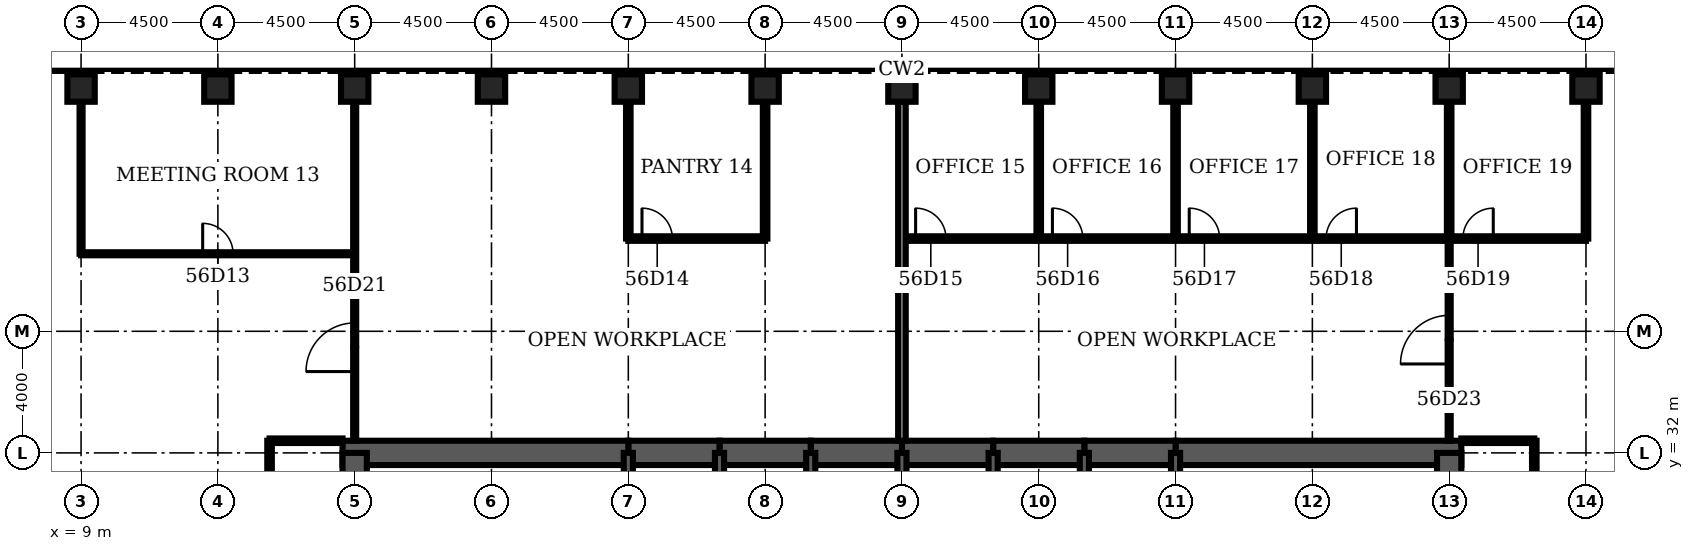
"""IFC4 building model, lengths in metres.
Left out: names, types, materials, properties, quantities, classifications, styles, units other than length and angle.
Written with IfcOpenShell. Run it as: python <this file> out.ifc"""

import sys

from ifc_helpers import new_model, si_unit, direction, frame, frame_2d, origin, origin_2d, place, context, subcontext, project, spatial, rectangle, hollow_rectangle, extrude, element, fill, save


model = new_model("IFC4")
c1 = context("Model", 3, precision=1e-05, world=origin(), true_north=direction((0.0, 1.0)))
c2 = subcontext(c1, "Body", "Model", "MODEL_VIEW")
j1 = project(units=[si_unit("LENGTHUNIT", "METRE"), si_unit("PLANEANGLEUNIT", "RADIAN")], contexts=[c1])
p1 = place(None, origin())
s1 = spatial("IfcSite", under=j1, at=p1, CompositionType="ELEMENT")
p2 = place(p1, origin())
s2 = spatial("IfcBuilding", under=s1, at=p2, CompositionType="ELEMENT")
p3 = place(p2, frame((0.0, 0.0, 248.8)))
s3 = spatial("IfcBuildingStorey", under=s2, at=p3, CompositionType="ELEMENT", Elevation=248.8)
for number, where, z_axis, x_axis in (
    (1, (58.5, 44.0, 0.0), (0.0, 0.0, 1.0), (0.0, 1.0, 0.0)),
    (2, (54.0, 44.0, 0.0), (0.0, 0.0, 1.0), (0.0, 1.0, 0.0)),
    (3, (49.5, 44.0, 0.0), (0.0, 0.0, 1.0), (0.0, 1.0, 0.0)),
    (4, (45.0, 44.0, 0.0), (0.0, 0.0, 1.0), (0.0, 1.0, 0.0)),
    (5, (40.5, 44.0, 0.0), (0.0, 0.0, 1.0), (0.0, 1.0, 0.0)),
    (6, (36.0, 44.0, 0.0), (0.0, 0.0, 1.0), (0.0, 1.0, 0.0)),
    (7, (31.5, 44.0, 0.0), (0.0, 0.0, 1.0), (0.0, 1.0, 0.0)),
    (8, (27.0, 44.0, 0.0), (0.0, 0.0, 1.0), (0.0, 1.0, 0.0)),
    (9, (22.5, 44.0, 0.0), (0.0, 0.0, 1.0), (0.0, 1.0, 0.0)),
    (10, (18.0, 44.0, 0.0), (0.0, 0.0, 1.0), (0.0, 1.0, 0.0)),
    (11, (13.5, 44.0, 0.0), (0.0, 0.0, 1.0), (0.0, 1.0, 0.0)),
    (12, (9.0, 44.0, 0.0), (0.0, 0.0, 1.0), (0.0, 1.0, 0.0)),
):
    element("IfcColumn", number, at=place(p3, frame(where, z_axis=z_axis, x_axis=x_axis)), inside=s3, PredefinedType="COLUMN", context=c2, shape_type="SweptSolid", body=[
        extrude(hollow_rectangle(XDim=0.9, YDim=0.9, WallThickness=0.07, at=origin_2d()), origin(), (0.0, 0.0, 1.0), 4.2),
    ])
p4 = place(p3, frame((54.4, 32.0, 0.0), z_axis=(0.0, 0.0, 1.0), x_axis=(-1.0, 0.0, 0.0)))
e13 = element("IfcWall", 13, at=p4, inside=s3, PredefinedType="SHEAR", context=c2, shape_type="SweptSolid", body=[
    extrude(rectangle(XDim=9.4, YDim=0.8, at=frame_2d((4.7, 0.0))), origin(), (0.0, 0.0, 1.0), 4.2),
])
for number, where, z_axis, x_axis in (
    (14, (45.0, 32.0, 0.0), (0.0, 0.0, 1.0), (-1.0, 0.0, 0.0)),
    (15, (42.0, 32.0, 0.0), (0.0, 0.0, 1.0), (-1.0, 0.0, 0.0)),
    (16, (39.0, 32.0, 0.0), (0.0, 0.0, 1.0), (-1.0, 0.0, 0.0)),
    (17, (36.0, 32.0, 0.0), (0.0, 0.0, 1.0), (-1.0, 0.0, 0.0)),
    (18, (33.0, 32.0, 0.0), (0.0, 0.0, 1.0), (-1.0, 0.0, 0.0)),
    (19, (30.0, 32.0, 0.0), (0.0, 0.0, 1.0), (-1.0, 0.0, 0.0)),
):
    element("IfcWall", number, at=place(p3, frame(where, z_axis=z_axis, x_axis=x_axis)), inside=s3, PredefinedType="SHEAR", context=c2, shape_type="SweptSolid", body=[
        extrude(rectangle(XDim=3.0, YDim=0.8, at=frame_2d((1.5, 0.0))), origin(), (0.0, 0.0, 1.0), 4.2),
    ])
p5 = place(p3, frame((27.0, 32.0, 0.0), z_axis=(0.0, 0.0, 1.0), x_axis=(-1.0, 0.0, 0.0)))
e20 = element("IfcWall", 20, at=p5, inside=s3, PredefinedType="SHEAR", context=c2, shape_type="SweptSolid", body=[
    extrude(rectangle(XDim=9.4, YDim=0.8, at=frame_2d((4.7, 0.0))), origin(), (0.0, 0.0, 1.0), 4.2),
])
for number, where, z_axis, x_axis in (
    (21, (18.0, 32.0, 0.0), (0.0, 0.0, 1.0), (0.0, -1.0, 0.0)),
    (22, (54.0, 28.8, 0.0), (0.0, 0.0, 1.0), (0.0, 1.0, 0.0)),
):
    element("IfcWall", number, at=place(p3, frame(where, z_axis=z_axis, x_axis=x_axis)), inside=s3, PredefinedType="SHEAR", context=c2, shape_type="SweptSolid", body=[
        extrude(rectangle(XDim=3.2, YDim=0.8, at=frame_2d((1.6, 0.0))), origin(), (0.0, 0.0, 1.0), 4.2),
    ])
for number, where, z_axis, x_axis in (
    (23, (27.0, 28.8, 0.0), (0.0, 0.0, 1.0), (0.0, 1.0, 0.0)),
    (24, (30.0, 28.8, 0.0), (0.0, 0.0, 1.0), (0.0, 1.0, 0.0)),
    (25, (33.0, 28.8, 0.0), (0.0, 0.0, 1.0), (0.0, 1.0, 0.0)),
    (26, (36.0, 28.8, 0.0), (0.0, 0.0, 1.0), (0.0, 1.0, 0.0)),
    (27, (39.0, 28.8, 0.0), (0.0, 0.0, 1.0), (0.0, 1.0, 0.0)),
    (28, (42.0, 28.8, 0.0), (0.0, 0.0, 1.0), (0.0, 1.0, 0.0)),
    (29, (45.0, 28.8, 0.0), (0.0, 0.0, 1.0), (0.0, 1.0, 0.0)),
):
    element("IfcWall", number, at=place(p3, frame(where, z_axis=z_axis, x_axis=x_axis)), inside=s3, PredefinedType="SOLIDWALL", context=c2, shape_type="SweptSolid", body=[
        extrude(rectangle(XDim=3.2, YDim=0.3, at=frame_2d((1.6, 0.0))), origin(), (0.0, 0.0, 1.0), 4.2),
    ])
for number, where, z_axis, x_axis in (
    (30, (15.2, 32.4, 0.0), (0.0, 0.0, 1.0), (1.0, 0.0, 0.0)),
    (31, (54.4, 32.4, 0.0), (0.0, 0.0, 1.0), (1.0, 0.0, 0.0)),
):
    element("IfcWall", number, at=place(p3, frame(where, z_axis=z_axis, x_axis=x_axis)), inside=s3, PredefinedType="PARTITIONING", context=c2, shape_type="SweptSolid", body=[
        extrude(rectangle(XDim=2.4, YDim=0.15, at=frame_2d((1.2, 0.0))), origin(), (0.0, 0.0, 1.0), 3.0),
    ])
p6 = place(p3, frame((9.0, 38.55, 0.0), z_axis=(0.0, 0.0, 1.0), x_axis=(1.0, 0.0, 0.0)))
e32 = element("IfcWall", 32, at=p6, inside=s3, PredefinedType="PARTITIONING", context=c2, shape_type="SweptSolid", body=[
    extrude(rectangle(XDim=9.0, YDim=0.1, at=frame_2d((4.5, 0.0))), origin(), (0.0, 0.0, 1.0), 3.0),
])
p7 = place(p6, frame((4.0, 0.0, 0.0)))
e33 = element("IfcOpeningElement", 33, at=p7, cuts=e32, PredefinedType="OPENING", context=c2, shape_type="SweptSolid", body=[
    extrude(rectangle(XDim=1.0, YDim=2.1, at=frame_2d((0.5, 1.05))), frame((0.0, 0.06, 0.0), z_axis=(0.0, -1.0, 0.0), x_axis=(1.0, 0.0, 0.0)), (0.0, 0.0, 1.0), 0.12),
])
p8 = place(p3, frame((27.0, 39.05, 0.0), z_axis=(0.0, 0.0, 1.0), x_axis=(1.0, 0.0, 0.0)))
e34 = element("IfcWall", 34, at=p8, inside=s3, PredefinedType="PARTITIONING", context=c2, shape_type="SweptSolid", body=[
    extrude(rectangle(XDim=4.5, YDim=0.15, at=frame_2d((2.25, 0.0))), origin(), (0.0, 0.0, 1.0), 3.0),
])
p9 = place(p8, frame((0.45, 0.0, 0.0)))
e35 = element("IfcOpeningElement", 35, at=p9, cuts=e34, PredefinedType="OPENING", context=c2, shape_type="SweptSolid", body=[
    extrude(rectangle(XDim=1.0, YDim=2.1, at=frame_2d((0.5, 1.05))), frame((0.0, 0.085, 0.0), z_axis=(0.0, -1.0, 0.0), x_axis=(1.0, 0.0, 0.0)), (0.0, 0.0, 1.0), 0.17),
])
p10 = place(p3, frame((36.0, 39.05, 0.0), z_axis=(0.0, 0.0, 1.0), x_axis=(1.0, 0.0, 0.0)))
e36 = element("IfcWall", 36, at=p10, inside=s3, PredefinedType="PARTITIONING", context=c2, shape_type="SweptSolid", body=[
    extrude(rectangle(XDim=22.5, YDim=0.15, at=frame_2d((11.25, 0.0))), origin(), (0.0, 0.0, 1.0), 3.0),
])
p11 = place(p10, frame((0.45, 0.0, 0.0)))
e37 = element("IfcOpeningElement", 37, at=p11, cuts=e36, PredefinedType="OPENING", context=c2, shape_type="SweptSolid", body=[
    extrude(rectangle(XDim=1.0, YDim=2.1, at=frame_2d((0.5, 1.05))), frame((0.0, 0.085, 0.0), z_axis=(0.0, -1.0, 0.0), x_axis=(1.0, 0.0, 0.0)), (0.0, 0.0, 1.0), 0.17),
])
p12 = place(p10, frame((4.95, 0.0, 0.0)))
e38 = element("IfcOpeningElement", 38, at=p12, cuts=e36, PredefinedType="OPENING", context=c2, shape_type="SweptSolid", body=[
    extrude(rectangle(XDim=1.0, YDim=2.1, at=frame_2d((0.5, 1.05))), frame((0.0, 0.085, 0.0), z_axis=(0.0, -1.0, 0.0), x_axis=(1.0, 0.0, 0.0)), (0.0, 0.0, 1.0), 0.17),
])
p13 = place(p10, frame((9.45, 0.0, 0.0)))
e39 = element("IfcOpeningElement", 39, at=p13, cuts=e36, PredefinedType="OPENING", context=c2, shape_type="SweptSolid", body=[
    extrude(rectangle(XDim=1.0, YDim=2.1, at=frame_2d((0.5, 1.05))), frame((0.0, 0.085, 0.0), z_axis=(0.0, -1.0, 0.0), x_axis=(1.0, 0.0, 0.0)), (0.0, 0.0, 1.0), 0.17),
])
p14 = place(p10, frame((13.95, 0.0, 0.0)))
e40 = element("IfcOpeningElement", 40, at=p14, cuts=e36, PredefinedType="OPENING", context=c2, shape_type="SweptSolid", body=[
    extrude(rectangle(XDim=1.0, YDim=2.1, at=frame_2d((0.5, 1.05))), frame((0.0, 0.085, 0.0), z_axis=(0.0, -1.0, 0.0), x_axis=(1.0, 0.0, 0.0)), (0.0, 0.0, 1.0), 0.17),
])
p15 = place(p10, frame((18.45, 0.0, 0.0)))
e41 = element("IfcOpeningElement", 41, at=p15, cuts=e36, PredefinedType="OPENING", context=c2, shape_type="SweptSolid", body=[
    extrude(rectangle(XDim=1.0, YDim=2.1, at=frame_2d((0.5, 1.05))), frame((0.0, 0.085, 0.0), z_axis=(0.0, -1.0, 0.0), x_axis=(1.0, 0.0, 0.0)), (0.0, 0.0, 1.0), 0.17),
])
p16 = place(p3, frame((9.0, 38.55, 0.0), z_axis=(0.0, 0.0, 1.0), x_axis=(0.0, 1.0, 0.0)))
e42 = element("IfcWall", 42, at=p16, inside=s3, PredefinedType="PARTITIONING", context=c2, shape_type="SweptSolid", body=[
    extrude(rectangle(XDim=5.0, YDim=0.1, at=frame_2d((2.5, 0.0))), origin(), (0.0, 0.0, 1.0), 3.0),
])
p17 = place(p3, frame((15.2, 13.8, 0.0), z_axis=(0.0, 0.0, 1.0), x_axis=(0.0, 1.0, 0.0)))
e43 = element("IfcWall", 43, at=p17, inside=s3, PredefinedType="PARTITIONING", context=c2, shape_type="SweptSolid", body=[
    extrude(rectangle(XDim=18.6, YDim=0.15, at=frame_2d((9.3, 0.0))), origin(), (0.0, 0.0, 1.0), 3.0),
])
p18 = place(p17, frame((8.7, 0.0, 0.0)))
e44 = element("IfcOpeningElement", 44, at=p18, cuts=e43, PredefinedType="OPENING", context=c2, shape_type="SweptSolid", body=[
    extrude(rectangle(XDim=1.2, YDim=2.1, at=frame_2d((0.6, 1.05))), frame((0.0, 0.085, 0.0), z_axis=(0.0, -1.0, 0.0), x_axis=(1.0, 0.0, 0.0)), (0.0, 0.0, 1.0), 0.17),
])
p19 = place(p3, frame((18.0, 32.4, 0.0), z_axis=(0.0, 0.0, 1.0), x_axis=(0.0, 1.0, 0.0)))
e45 = element("IfcWall", 45, at=p19, inside=s3, PredefinedType="PARTITIONING", context=c2, shape_type="SweptSolid", body=[
    extrude(rectangle(XDim=11.15, YDim=0.1, at=frame_2d((5.575, 0.0))), origin(), (0.0, 0.0, 1.0), 3.0),
])
p20 = place(p19, frame((2.275, 0.0, 0.0)))
e46 = element("IfcOpeningElement", 46, at=p20, cuts=e45, PredefinedType="OPENING", context=c2, shape_type="SweptSolid", body=[
    extrude(rectangle(XDim=1.6, YDim=2.1, at=frame_2d((0.8, 1.05))), frame((0.0, 0.06, 0.0), z_axis=(0.0, -1.0, 0.0), x_axis=(1.0, 0.0, 0.0)), (0.0, 0.0, 1.0), 0.12),
])
for number, where, z_axis, x_axis in (
    (47, (27.0, 39.05, 0.0), (0.0, 0.0, 1.0), (0.0, 1.0, 0.0)),
    (48, (31.5, 39.05, 0.0), (0.0, 0.0, 1.0), (0.0, 1.0, 0.0)),
):
    element("IfcWall", number, at=place(p3, frame(where, z_axis=z_axis, x_axis=x_axis)), inside=s3, PredefinedType="PARTITIONING", context=c2, shape_type="SweptSolid", body=[
        extrude(rectangle(XDim=4.5, YDim=0.15, at=frame_2d((2.25, 0.0))), origin(), (0.0, 0.0, 1.0), 3.0),
    ])
p21 = place(p3, frame((36.0, 32.4, 0.0), z_axis=(0.0, 0.0, 1.0), x_axis=(0.0, 1.0, 0.0)))
e49 = element("IfcWall", 49, at=p21, inside=s3, PredefinedType="PARTITIONING", context=c2, shape_type="SweptSolid", body=[
    extrude(rectangle(XDim=11.15, YDim=0.25, at=frame_2d((5.575, 0.0))), origin(), (0.0, 0.0, 1.0), 3.0),
])
for number, where, z_axis, x_axis in (
    (50, (40.5, 39.05, 0.0), (0.0, 0.0, 1.0), (0.0, 1.0, 0.0)),
    (51, (45.0, 39.05, 0.0), (0.0, 0.0, 1.0), (0.0, 1.0, 0.0)),
    (52, (49.5, 39.05, 0.0), (0.0, 0.0, 1.0), (0.0, 1.0, 0.0)),
):
    element("IfcWall", number, at=place(p3, frame(where, z_axis=z_axis, x_axis=x_axis)), inside=s3, PredefinedType="PARTITIONING", context=c2, shape_type="SweptSolid", body=[
        extrude(rectangle(XDim=4.5, YDim=0.15, at=frame_2d((2.25, 0.0))), origin(), (0.0, 0.0, 1.0), 3.0),
    ])
p22 = place(p3, frame((54.0, 32.4, 0.0), z_axis=(0.0, 0.0, 1.0), x_axis=(0.0, 1.0, 0.0)))
e53 = element("IfcWall", 53, at=p22, inside=s3, PredefinedType="PARTITIONING", context=c2, shape_type="SweptSolid", body=[
    extrude(rectangle(XDim=6.65, YDim=0.1, at=frame_2d((3.325, 0.0))), origin(), (0.0, 0.0, 1.0), 3.0),
])
p23 = place(p22, frame((2.525, 0.0, 0.0)))
e54 = element("IfcOpeningElement", 54, at=p23, cuts=e53, PredefinedType="OPENING", context=c2, shape_type="SweptSolid", body=[
    extrude(rectangle(XDim=1.6, YDim=2.1, at=frame_2d((0.8, 1.05))), frame((0.0, 0.06, 0.0), z_axis=(0.0, -1.0, 0.0), x_axis=(1.0, 0.0, 0.0)), (0.0, 0.0, 1.0), 0.12),
])
p24 = place(p3, frame((54.0, 39.05, 0.0), z_axis=(0.0, 0.0, 1.0), x_axis=(0.0, 1.0, 0.0)))
e55 = element("IfcWall", 55, at=p24, inside=s3, PredefinedType="PARTITIONING", context=c2, shape_type="SweptSolid", body=[
    extrude(rectangle(XDim=4.5, YDim=0.15, at=frame_2d((2.25, 0.0))), origin(), (0.0, 0.0, 1.0), 3.0),
])
p25 = place(p3, frame((56.8, 13.8, 0.0), z_axis=(0.0, 0.0, 1.0), x_axis=(0.0, 1.0, 0.0)))
e56 = element("IfcWall", 56, at=p25, inside=s3, PredefinedType="PARTITIONING", context=c2, shape_type="SweptSolid", body=[
    extrude(rectangle(XDim=18.6, YDim=0.15, at=frame_2d((9.3, 0.0))), origin(), (0.0, 0.0, 1.0), 3.0),
])
p26 = place(p25, frame((8.7, 0.0, 0.0)))
e57 = element("IfcOpeningElement", 57, at=p26, cuts=e56, PredefinedType="OPENING", context=c2, shape_type="SweptSolid", body=[
    extrude(rectangle(XDim=1.2, YDim=2.1, at=frame_2d((0.6, 1.05))), frame((0.0, 0.085, 0.0), z_axis=(0.0, -1.0, 0.0), x_axis=(1.0, 0.0, 0.0)), (0.0, 0.0, 1.0), 0.17),
])
p27 = place(p3, frame((58.5, 39.05, 0.0), z_axis=(0.0, 0.0, 1.0), x_axis=(0.0, 1.0, 0.0)))
e58 = element("IfcWall", 58, at=p27, inside=s3, PredefinedType="PARTITIONING", context=c2, shape_type="SweptSolid", body=[
    extrude(rectangle(XDim=4.5, YDim=0.15, at=frame_2d((2.25, 0.0))), origin(), (0.0, 0.0, 1.0), 3.0),
])
p28 = place(p7, origin())
e59 = element("IfcDoor", 59, at=p28, inside=s3, OperationType="SINGLE_SWING_LEFT", PredefinedType="DOOR", context=c2, shape_type="SweptSolid", body=[
    extrude(rectangle(XDim=1.0, YDim=2.1, at=frame_2d((0.5, 1.05))), frame((0.0, 0.025, 0.0), z_axis=(0.0, -1.0, 0.0), x_axis=(1.0, 0.0, 0.0)), (0.0, 0.0, 1.0), 0.05),
])
fill(e33, e59)
p29 = place(p9, origin())
e60 = element("IfcDoor", 60, at=p29, inside=s3, OperationType="SINGLE_SWING_LEFT", PredefinedType="DOOR", context=c2, shape_type="SweptSolid", body=[
    extrude(rectangle(XDim=1.0, YDim=2.1, at=frame_2d((0.5, 1.05))), frame((0.0, 0.025, 0.0), z_axis=(0.0, -1.0, 0.0), x_axis=(1.0, 0.0, 0.0)), (0.0, 0.0, 1.0), 0.05),
])
fill(e35, e60)
p30 = place(p11, origin())
e61 = element("IfcDoor", 61, at=p30, inside=s3, OperationType="SINGLE_SWING_LEFT", PredefinedType="DOOR", context=c2, shape_type="SweptSolid", body=[
    extrude(rectangle(XDim=1.0, YDim=2.1, at=frame_2d((0.5, 1.05))), frame((0.0, 0.025, 0.0), z_axis=(0.0, -1.0, 0.0), x_axis=(1.0, 0.0, 0.0)), (0.0, 0.0, 1.0), 0.05),
])
fill(e37, e61)
p31 = place(p12, origin())
e62 = element("IfcDoor", 62, at=p31, inside=s3, OperationType="SINGLE_SWING_LEFT", PredefinedType="DOOR", context=c2, shape_type="SweptSolid", body=[
    extrude(rectangle(XDim=1.0, YDim=2.1, at=frame_2d((0.5, 1.05))), frame((0.0, 0.025, 0.0), z_axis=(0.0, -1.0, 0.0), x_axis=(1.0, 0.0, 0.0)), (0.0, 0.0, 1.0), 0.05),
])
fill(e38, e62)
p32 = place(p13, origin())
e63 = element("IfcDoor", 63, at=p32, inside=s3, OperationType="SINGLE_SWING_LEFT", PredefinedType="DOOR", context=c2, shape_type="SweptSolid", body=[
    extrude(rectangle(XDim=1.0, YDim=2.1, at=frame_2d((0.5, 1.05))), frame((0.0, 0.025, 0.0), z_axis=(0.0, -1.0, 0.0), x_axis=(1.0, 0.0, 0.0)), (0.0, 0.0, 1.0), 0.05),
])
fill(e39, e63)
p33 = place(p14, origin())
e64 = element("IfcDoor", 64, at=p33, inside=s3, OperationType="SINGLE_SWING_RIGHT", PredefinedType="DOOR", context=c2, shape_type="SweptSolid", body=[
    extrude(rectangle(XDim=1.0, YDim=2.1, at=frame_2d((0.5, 1.05))), frame((0.0, 0.025, 0.0), z_axis=(0.0, -1.0, 0.0), x_axis=(1.0, 0.0, 0.0)), (0.0, 0.0, 1.0), 0.05),
])
fill(e40, e64)
p34 = place(p15, origin())
e65 = element("IfcDoor", 65, at=p34, inside=s3, OperationType="SINGLE_SWING_RIGHT", PredefinedType="DOOR", context=c2, shape_type="SweptSolid", body=[
    extrude(rectangle(XDim=1.0, YDim=2.1, at=frame_2d((0.5, 1.05))), frame((0.0, 0.025, 0.0), z_axis=(0.0, -1.0, 0.0), x_axis=(1.0, 0.0, 0.0)), (0.0, 0.0, 1.0), 0.05),
])
fill(e41, e65)
p35 = place(p20, origin())
e66 = element("IfcDoor", 66, at=p35, inside=s3, OperationType="SINGLE_SWING_LEFT", PredefinedType="DOOR", context=c2, shape_type="SweptSolid", body=[
    extrude(rectangle(XDim=1.6, YDim=2.1, at=frame_2d((0.8, 1.05))), frame((0.0, 0.025, 0.0), z_axis=(0.0, -1.0, 0.0), x_axis=(1.0, 0.0, 0.0)), (0.0, 0.0, 1.0), 0.05),
])
fill(e46, e66)
p36 = place(p23, origin())
e67 = element("IfcDoor", 67, at=p36, inside=s3, OperationType="SINGLE_SWING_LEFT", PredefinedType="DOOR", context=c2, shape_type="SweptSolid", body=[
    extrude(rectangle(XDim=1.6, YDim=2.1, at=frame_2d((0.8, 1.05))), frame((0.0, 0.025, 0.0), z_axis=(0.0, -1.0, 0.0), x_axis=(1.0, 0.0, 0.0)), (0.0, 0.0, 1.0), 0.05),
])
fill(e54, e67)
save(model, sys.argv[1])
